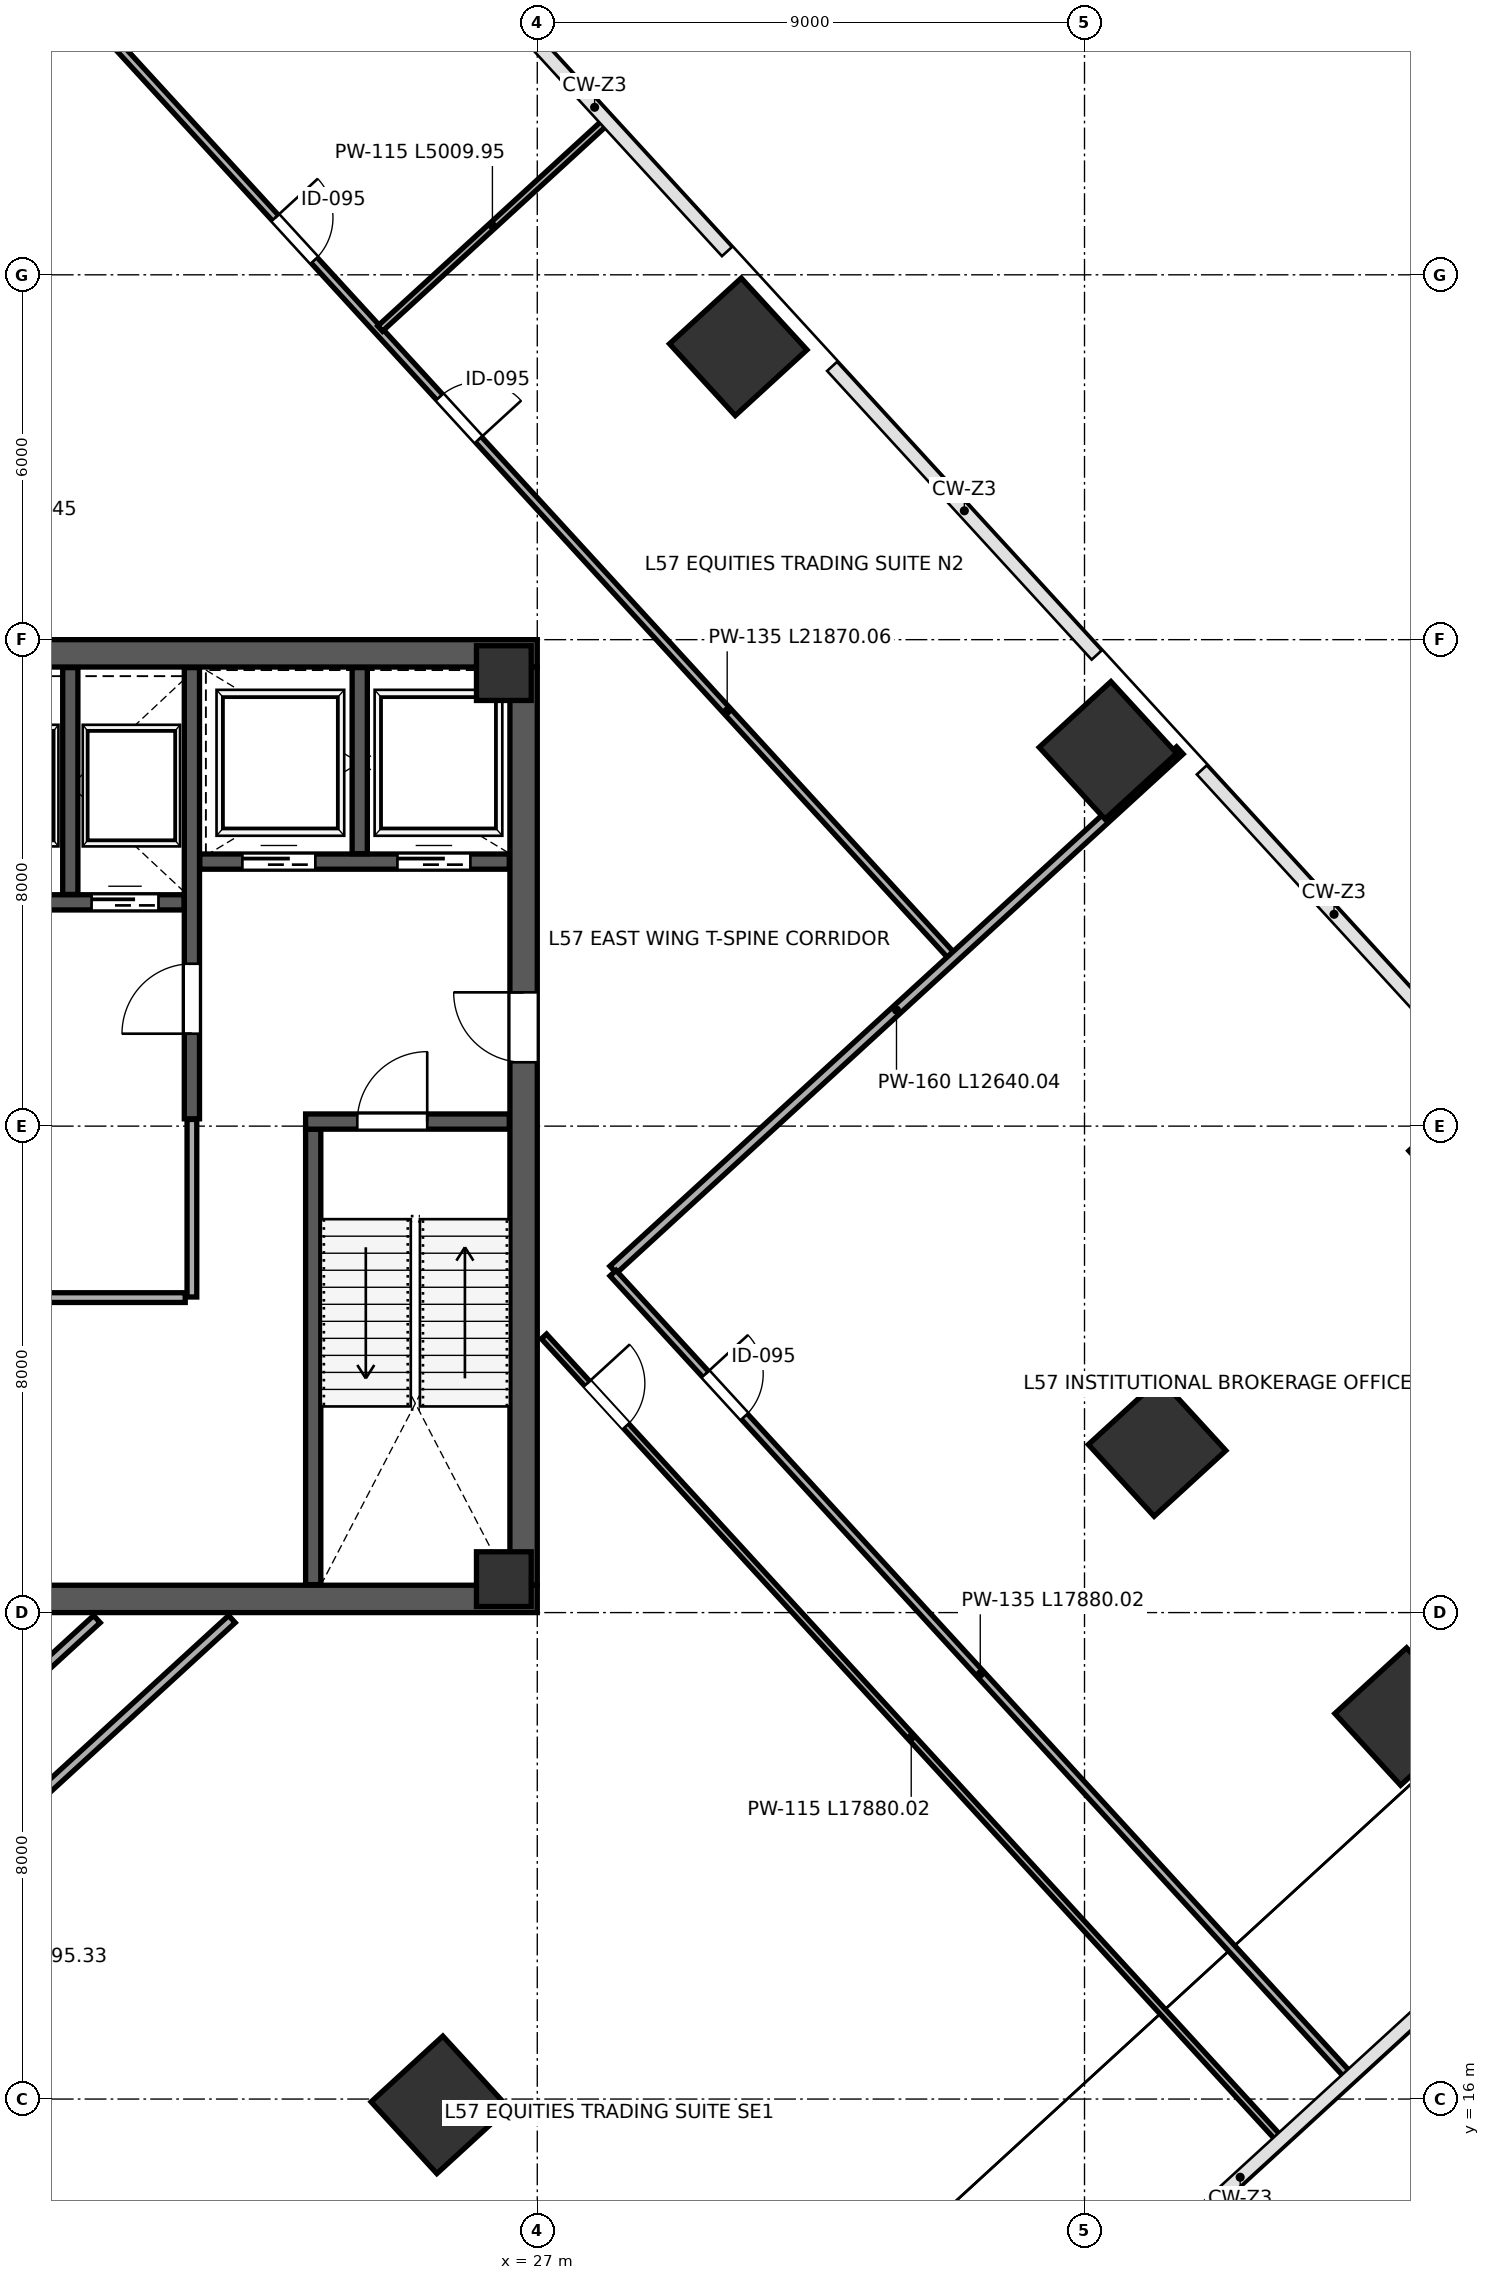
"""IFC4 building model, lengths in metres.
Left out: names, types, materials, properties, quantities, classifications, styles, units other than length and angle.
Written with IfcOpenShell. Run it as: python <this file> out.ifc"""

import sys

from ifc_helpers import new_model, si_unit, direction, frame, frame_2d, origin, origin_2d, place, context, subcontext, project, spatial, rectangle, extrude, source, transform, mapped, element, fill, save


model = new_model("IFC4")
c1 = context("Model", 3, precision=1e-05, world=origin(), true_north=direction((0.0, 1.0)))
c2 = subcontext(c1, "Body", "Model", "MODEL_VIEW")
j1 = project(units=[si_unit("LENGTHUNIT", "METRE"), si_unit("PLANEANGLEUNIT", "RADIAN")], contexts=[c1])
p1 = place(None, origin())
s1 = spatial("IfcSite", under=j1, at=p1, CompositionType="ELEMENT")
p2 = place(p1, origin())
s2 = spatial("IfcBuilding", under=s1, at=p2, CompositionType="ELEMENT")
p3 = place(p2, frame((0.0, 0.0, 254.2)))
s3 = spatial("IfcBuildingStorey", under=s2, at=p3, CompositionType="ELEMENT", Elevation=254.2)
m1 = source(origin(), c2, "Body", "SweptSolid", [
    extrude(rectangle(XDim=0.9, YDim=0.9, at=origin_2d()), origin(), (0.0, 0.0, 1.0), 4.198),
])
for number, where, z_axis, x_axis in (
    (1, (26.45, 24.55, 0.001), (0.0, 0.0, 1.0), (1.0, 0.0, 0.0)),
    (2, (26.45, 39.45, 0.001), (0.0, 0.0, 1.0), (1.0, 0.0, 0.0)),
):
    element("IfcColumn", number, at=place(p3, frame(where, z_axis=z_axis, x_axis=x_axis)), inside=s3, PredefinedType="COLUMN", context=c2, shape_type="MappedRepresentation", body=[
        mapped(m1, transform((0.0, 0.0, 0.0), scale=1.0)),
    ])
m2 = source(origin(), c2, "Body", "SweptSolid", [
    extrude(rectangle(XDim=1.6, YDim=1.6, at=origin_2d()), origin(), (0.0, 0.0, 1.0), 4.198),
])
for number, where, z_axis, x_axis in (
    (3, (30.305, 44.816, 0.001), (0.0, 0.0, 1.0), (-0.676, 0.737, 0.0)),
    (4, (36.385, 38.18, 0.001), (0.0, 0.0, 1.0), (-0.676, 0.737, 0.0)),
):
    element("IfcColumn", number, at=place(p3, frame(where, z_axis=z_axis, x_axis=x_axis)), inside=s3, PredefinedType="COLUMN", context=c2, shape_type="MappedRepresentation", body=[
        mapped(m2, transform((0.0, 0.0, 0.0), scale=1.0)),
    ])
m3 = source(origin(), c2, "Body", "SweptSolid", [
    extrude(rectangle(XDim=1.6, YDim=1.6, at=origin_2d()), origin(), (0.0, 0.0, 1.0), 4.198),
])
for number, where, z_axis, x_axis in (
    (5, (25.398, 15.905, 0.001), (0.0, 0.0, 1.0), (-0.676, 0.737, 0.0)),
    (6, (37.194, 26.714, 0.001), (0.0, 0.0, 1.0), (-0.676, 0.737, 0.0)),
):
    element("IfcColumn", number, at=place(p3, frame(where, z_axis=z_axis, x_axis=x_axis)), inside=s3, PredefinedType="COLUMN", context=c2, shape_type="MappedRepresentation", body=[
        mapped(m3, transform((0.0, 0.0, 0.0), scale=1.0)),
    ])
for number, where, z_axis, x_axis in (
    (7, (42.466, 31.545, 0.001), (0.0, 0.0, 1.0), (-0.676, 0.737, 0.0)),
    (8, (41.248, 22.291, 0.001), (0.0, 0.0, 1.0), (-0.676, 0.737, 0.0)),
):
    element("IfcColumn", number, at=place(p3, frame(where, z_axis=z_axis, x_axis=x_axis)), inside=s3, PredefinedType="COLUMN", context=c2, shape_type="MappedRepresentation", body=[
        mapped(m2, transform((0.0, 0.0, 0.0), scale=1.0)),
    ])
p4 = place(p3, frame((26.775, 24.45, 0.0), z_axis=(0.0, 0.0, 1.0), x_axis=(0.0, 1.0, 0.0)))
e9 = element("IfcWall", 9, at=p4, inside=s3, PredefinedType="SHEAR", context=c2, shape_type="SweptSolid", body=[
    extrude(rectangle(XDim=15.1, YDim=0.45, at=frame_2d((7.55, 0.0))), origin(), (0.0, 0.0, 1.0), 3.96),
])
p5 = place(p4, frame((8.6, 0.0, 0.0)))
e10 = element("IfcOpeningElement", 10, at=p5, cuts=e9, PredefinedType="OPENING", context=c2, shape_type="SweptSolid", body=[
    extrude(rectangle(XDim=1.15, YDim=2.2, at=frame_2d((0.575, 1.1))), frame((0.0, 0.235, 0.0), z_axis=(0.0, -1.0, 0.0), x_axis=(1.0, 0.0, 0.0)), (0.0, 0.0, 1.0), 0.47),
])
for number, where, z_axis, x_axis in (
    (11, (9.0, 24.225, 0.0), (0.0, 0.0, 1.0), (1.0, 0.0, 0.0)),
    (12, (9.0, 39.775, 0.0), (0.0, 0.0, 1.0), (1.0, 0.0, 0.0)),
):
    element("IfcWall", number, at=place(p3, frame(where, z_axis=z_axis, x_axis=x_axis)), inside=s3, PredefinedType="SHEAR", context=c2, shape_type="SweptSolid", body=[
        extrude(rectangle(XDim=18.0, YDim=0.45, at=frame_2d((9.0, 0.0))), origin(), (0.0, 0.0, 1.0), 3.96),
    ])
p6 = place(p3, frame((23.315, 24.46, 0.0), z_axis=(0.0, 0.0, 1.0), x_axis=(0.0, 1.0, 0.0)))
e13 = element("IfcWall", 13, at=p6, inside=s3, PredefinedType="SHEAR", context=c2, shape_type="SweptSolid", body=[
    extrude(rectangle(XDim=7.49, YDim=0.25, at=frame_2d((3.745, 0.0))), origin(), (0.0, 0.0, 1.0), 3.96),
])
p7 = place(p3, frame((23.19, 32.075, 0.0), z_axis=(0.0, 0.0, 1.0), x_axis=(1.0, 0.0, 0.0)))
e14 = element("IfcWall", 14, at=p7, inside=s3, PredefinedType="SHEAR", context=c2, shape_type="SweptSolid", body=[
    extrude(rectangle(XDim=3.35, YDim=0.25, at=frame_2d((1.675, 0.0))), origin(), (0.0, 0.0, 1.0), 3.96),
])
p8 = place(p7, frame((0.85, 0.0, 0.0)))
e15 = element("IfcOpeningElement", 15, at=p8, cuts=e14, PredefinedType="OPENING", context=c2, shape_type="SweptSolid", body=[
    extrude(rectangle(XDim=1.15, YDim=2.2, at=frame_2d((0.575, 1.1))), frame((0.0, 0.135, 0.0), z_axis=(0.0, -1.0, 0.0), x_axis=(1.0, 0.0, 0.0)), (0.0, 0.0, 1.0), 0.27),
])
p9 = place(p3, frame((21.32, 32.12, 0.0), z_axis=(0.0, 0.0, 1.0), x_axis=(0.0, 1.0, 0.0)))
e16 = element("IfcWall", 16, at=p9, inside=s3, PredefinedType="SHEAR", context=c2, shape_type="SweptSolid", body=[
    extrude(rectangle(XDim=7.42, YDim=0.25, at=frame_2d((3.71, 0.0))), origin(), (0.0, 0.0, 1.0), 3.96),
])
p10 = place(p9, frame((1.4, 0.0, 0.0)))
e17 = element("IfcOpeningElement", 17, at=p10, cuts=e16, PredefinedType="OPENING", context=c2, shape_type="SweptSolid", body=[
    extrude(rectangle(XDim=1.15, YDim=2.2, at=frame_2d((0.575, 1.1))), frame((0.0, 0.135, 0.0), z_axis=(0.0, -1.0, 0.0), x_axis=(1.0, 0.0, 0.0)), (0.0, 0.0, 1.0), 0.27),
])
p11 = place(p3, frame((21.45, 36.35, 0.0), z_axis=(0.0, 0.0, 1.0), x_axis=(1.0, 0.0, 0.0)))
e18 = element("IfcWall", 18, at=p11, inside=s3, PredefinedType="SHEAR", context=c2, shape_type="SweptSolid", body=[
    extrude(rectangle(XDim=5.09, YDim=0.25, at=frame_2d((2.545, 0.0))), origin(), (0.0, 0.0, 1.0), 3.96),
])
p12 = place(p11, frame((0.7, 0.0, 0.0)))
e19 = element("IfcOpeningElement", 19, at=p12, cuts=e18, PredefinedType="OPENING", context=c2, shape_type="SweptSolid", body=[
    extrude(rectangle(XDim=1.2, YDim=2.2, at=frame_2d((0.6, 1.1))), frame((0.0, 0.135, 0.0), z_axis=(0.0, -1.0, 0.0), x_axis=(1.0, 0.0, 0.0)), (0.0, 0.0, 1.0), 0.27),
])
p13 = place(p11, frame((3.25, 0.0, 0.0)))
e20 = element("IfcOpeningElement", 20, at=p13, cuts=e18, PredefinedType="OPENING", context=c2, shape_type="SweptSolid", body=[
    extrude(rectangle(XDim=1.2, YDim=2.2, at=frame_2d((0.6, 1.1))), frame((0.0, 0.135, 0.0), z_axis=(0.0, -1.0, 0.0), x_axis=(1.0, 0.0, 0.0)), (0.0, 0.0, 1.0), 0.27),
])
p14 = place(p3, frame((24.08, 36.48, 0.0), z_axis=(0.0, 0.0, 1.0), x_axis=(0.0, 1.0, 0.0)))
e21 = element("IfcWall", 21, at=p14, inside=s3, PredefinedType="SHEAR", context=c2, shape_type="SweptSolid", body=[
    extrude(rectangle(XDim=3.06, YDim=0.25, at=frame_2d((1.53, 0.0))), origin(), (0.0, 0.0, 1.0), 3.96),
])
p15 = place(p3, frame((17.32, 35.68, 0.0), z_axis=(0.0, 0.0, 1.0), x_axis=(1.0, 0.0, 0.0)))
e22 = element("IfcWall", 22, at=p15, inside=s3, PredefinedType="SHEAR", context=c2, shape_type="SweptSolid", body=[
    extrude(rectangle(XDim=3.87, YDim=0.25, at=frame_2d((1.935, 0.0))), origin(), (0.0, 0.0, 1.0), 3.96),
])
p16 = place(p15, frame((0.45, 0.0, 0.0)))
e23 = element("IfcOpeningElement", 23, at=p16, cuts=e22, PredefinedType="OPENING", context=c2, shape_type="SweptSolid", body=[
    extrude(rectangle(XDim=1.1, YDim=2.2, at=frame_2d((0.55, 1.1))), frame((0.0, 0.135, 0.0), z_axis=(0.0, -1.0, 0.0), x_axis=(1.0, 0.0, 0.0)), (0.0, 0.0, 1.0), 0.27),
])
p17 = place(p15, frame((2.35, 0.0, 0.0)))
e24 = element("IfcOpeningElement", 24, at=p17, cuts=e22, PredefinedType="OPENING", context=c2, shape_type="SweptSolid", body=[
    extrude(rectangle(XDim=1.1, YDim=2.2, at=frame_2d((0.55, 1.1))), frame((0.0, 0.135, 0.0), z_axis=(0.0, -1.0, 0.0), x_axis=(1.0, 0.0, 0.0)), (0.0, 0.0, 1.0), 0.27),
])
p18 = place(p3, frame((19.32, 35.81, 0.0), z_axis=(0.0, 0.0, 1.0), x_axis=(0.0, 1.0, 0.0)))
e25 = element("IfcWall", 25, at=p18, inside=s3, PredefinedType="SHEAR", context=c2, shape_type="SweptSolid", body=[
    extrude(rectangle(XDim=3.73, YDim=0.25, at=frame_2d((1.865, 0.0))), origin(), (0.0, 0.0, 1.0), 3.96),
])
p19 = place(p3, frame((12.84, 29.18, 0.0), z_axis=(0.0, 0.0, 1.0), x_axis=(1.0, 0.0, 0.0)))
e26 = element("IfcWall", 26, at=p19, inside=s3, PredefinedType="PARTITIONING", context=c2, shape_type="SweptSolid", body=[
    extrude(rectangle(XDim=8.37, YDim=0.16, at=frame_2d((4.185, 0.0))), origin(), (0.0, 0.0, 1.0), 3.96),
])
p20 = place(p19, frame((2.6, 0.0, 0.0)))
e27 = element("IfcOpeningElement", 27, at=p20, cuts=e26, PredefinedType="OPENING", context=c2, shape_type="SweptSolid", body=[
    extrude(rectangle(XDim=0.9, YDim=2.15, at=frame_2d((0.45, 1.075))), frame((0.0, 0.09, 0.0), z_axis=(0.0, -1.0, 0.0), x_axis=(1.0, 0.0, 0.0)), (0.0, 0.0, 1.0), 0.18),
])
p21 = place(p3, frame((21.32, 29.19, 0.0), z_axis=(0.0, 0.0, 1.0), x_axis=(0.0, 1.0, 0.0)))
e28 = element("IfcWall", 28, at=p21, inside=s3, PredefinedType="PARTITIONING", context=c2, shape_type="SweptSolid", body=[
    extrude(rectangle(XDim=2.92, YDim=0.16, at=frame_2d((1.46, 0.0))), origin(), (0.0, 0.0, 1.0), 3.96),
])
p22 = place(p3, frame((13.765, 18.402, 0.0), z_axis=(0.0, 0.0, 1.0), x_axis=(0.737266340408, 0.675602207887, 0.0)))
e29 = element("IfcWall", 29, at=p22, inside=s3, PredefinedType="PARTITIONING", context=c2, shape_type="SweptSolid", body=[
    extrude(rectangle(XDim=8.128, YDim=0.16, at=frame_2d((4.064, 0.0))), origin(), (0.0, 0.0, 1.0), 3.96),
])
p23 = place(p3, frame((19.042, 50.92, 0.0), z_axis=(0.0, 0.0, 1.0), x_axis=(0.675589646996, -0.737277850523, 0.0)))
e30 = element("IfcWall", 30, at=p23, inside=s3, PredefinedType="PARTITIONING", context=c2, shape_type="SweptSolid", body=[
    extrude(rectangle(XDim=21.87, YDim=0.135, at=frame_2d((10.935, 0.0))), origin(), (0.0, 0.0, 1.0), 3.96),
])
p24 = place(p23, frame((5.4, 0.0, 0.0)))
e31 = element("IfcOpeningElement", 31, at=p24, cuts=e30, PredefinedType="OPENING", context=c2, shape_type="SweptSolid", body=[
    extrude(rectangle(XDim=0.95, YDim=2.15, at=frame_2d((0.475, 1.075))), frame((0.0, 0.078, 0.0), z_axis=(0.0, -1.0, 0.0), x_axis=(1.0, 0.0, 0.0)), (0.0, 0.0, 1.0), 0.155),
])
p25 = place(p23, frame((9.4, 0.0, 0.0)))
e32 = element("IfcOpeningElement", 32, at=p25, cuts=e30, PredefinedType="OPENING", context=c2, shape_type="SweptSolid", body=[
    extrude(rectangle(XDim=0.95, YDim=2.15, at=frame_2d((0.475, 1.075))), frame((0.0, 0.078, 0.0), z_axis=(0.0, -1.0, 0.0), x_axis=(1.0, 0.0, 0.0)), (0.0, 0.0, 1.0), 0.155),
])
p26 = place(p3, frame((24.415, 45.115, 0.0), z_axis=(0.0, 0.0, 1.0), x_axis=(0.737279537385, 0.675587806101, 0.0)))
e33 = element("IfcWall", 33, at=p26, inside=s3, PredefinedType="PARTITIONING", context=c2, shape_type="SweptSolid", body=[
    extrude(rectangle(XDim=5.01, YDim=0.115, at=frame_2d((2.505, 0.0))), origin(), (0.0, 0.0, 1.0), 3.295),
])
p27 = place(p3, frame((1.393, 34.124, 0.0), z_axis=(0.0, 0.0, 1.0), x_axis=(0.737274323436, 0.675593496121, 0.0)))
e34 = element("IfcWall", 34, at=p27, inside=s3, PredefinedType="PARTITIONING", context=c2, shape_type="SweptSolid", body=[
    extrude(rectangle(XDim=27.402, YDim=0.135, at=frame_2d((13.701, 0.0))), origin(), (0.0, 0.0, 1.0), 3.96),
])
p28 = place(p3, frame((28.248, 29.639, 0.0), z_axis=(0.0, 0.0, 1.0), x_axis=(0.73728000412, 0.675587296746, 0.0)))
e35 = element("IfcWall", 35, at=p28, inside=s3, PredefinedType="PARTITIONING", context=c2, shape_type="SweptSolid", body=[
    extrude(rectangle(XDim=12.64, YDim=0.16, at=frame_2d((6.32, 0.0))), origin(), (0.0, 0.0, 1.0), 3.295),
])
p29 = place(p3, frame((12.47, 15.181, 0.0), z_axis=(0.0, 0.0, 1.0), x_axis=(0.737265724175, 0.675602880365, 0.0)))
e36 = element("IfcWall", 36, at=p29, inside=s3, PredefinedType="PARTITIONING", context=c2, shape_type="SweptSolid", body=[
    extrude(rectangle(XDim=12.895, YDim=0.16, at=frame_2d((6.448, 0.0))), origin(), (0.0, 0.0, 1.0), 3.96),
])
p30 = place(p3, frame((28.246, 29.582, 0.0), z_axis=(0.0, 0.0, 1.0), x_axis=(0.67559539026, -0.737272587758, 0.0)))
e37 = element("IfcWall", 37, at=p30, inside=s3, PredefinedType="PARTITIONING", context=c2, shape_type="SweptSolid", body=[
    extrude(rectangle(XDim=17.88, YDim=0.135, at=frame_2d((8.94, 0.0))), origin(), (0.0, 0.0, 1.0), 3.252),
])
p31 = place(p30, frame((2.25, 0.0, 0.0)))
e38 = element("IfcOpeningElement", 38, at=p31, cuts=e37, PredefinedType="OPENING", context=c2, shape_type="SweptSolid", body=[
    extrude(rectangle(XDim=0.95, YDim=2.15, at=frame_2d((0.475, 1.075))), frame((0.0, 0.078, 0.0), z_axis=(0.0, -1.0, 0.0), x_axis=(1.0, 0.0, 0.0)), (0.0, 0.0, 1.0), 0.155),
])
p32 = place(p3, frame((27.11, 28.542, 0.0), z_axis=(0.0, 0.0, 1.0), x_axis=(0.675588589041, -0.737278819957, 0.0)))
e39 = element("IfcWall", 39, at=p32, inside=s3, PredefinedType="PARTITIONING", context=c2, shape_type="SweptSolid", body=[
    extrude(rectangle(XDim=17.88, YDim=0.115, at=frame_2d((8.94, 0.0))), origin(), (0.0, 0.0, 1.0), 3.252),
])
p33 = place(p32, frame((1.05, 0.0, 0.0)))
e40 = element("IfcOpeningElement", 40, at=p33, cuts=e39, PredefinedType="OPENING", context=c2, shape_type="SweptSolid", body=[
    extrude(rectangle(XDim=0.95, YDim=2.15, at=frame_2d((0.475, 1.075))), frame((0.0, 0.067, 0.0), z_axis=(0.0, -1.0, 0.0), x_axis=(1.0, 0.0, 0.0)), (0.0, 0.0, 1.0), 0.135),
])
m4 = source(origin(), c2, "Body", "SweptSolid", [
    extrude(rectangle(XDim=1.15, YDim=2.2, at=frame_2d((0.575, 1.1))), frame((0.0, 0.025, 0.0), z_axis=(0.0, -1.0, 0.0), x_axis=(1.0, 0.0, 0.0)), (0.0, 0.0, 1.0), 0.05),
])
p34 = place(p10, origin())
e41 = element("IfcDoor", 41, at=p34, inside=s3, OperationType="SINGLE_SWING_LEFT", PredefinedType="DOOR", context=c2, shape_type="MappedRepresentation", body=[
    mapped(m4, transform((0.0, 0.0, 0.0), scale=1.0)),
])
fill(e17, e41)
m5 = source(origin(), c2, "Body", "SweptSolid", [
    extrude(rectangle(XDim=1.15, YDim=2.2, at=frame_2d((0.575, 1.1))), frame((0.0, 0.025, 0.0), z_axis=(0.0, -1.0, 0.0), x_axis=(1.0, 0.0, 0.0)), (0.0, 0.0, 1.0), 0.05),
])
p35 = place(p8, origin())
e42 = element("IfcDoor", 42, at=p35, inside=s3, OperationType="SINGLE_SWING_RIGHT", PredefinedType="DOOR", context=c2, shape_type="MappedRepresentation", body=[
    mapped(m5, transform((0.0, 0.0, 0.0), scale=1.0)),
])
fill(e15, e42)
p36 = place(p5, origin())
e43 = element("IfcDoor", 43, at=p36, inside=s3, OperationType="SINGLE_SWING_RIGHT", PredefinedType="DOOR", context=c2, shape_type="MappedRepresentation", body=[
    mapped(m4, transform((0.0, 0.0, 0.0), scale=1.0)),
])
fill(e10, e43)
m6 = source(origin(), c2, "Body", "SweptSolid", [
    extrude(rectangle(XDim=1.1, YDim=2.2, at=frame_2d((0.55, 1.1))), frame((0.0, 0.025, 0.0), z_axis=(0.0, -1.0, 0.0), x_axis=(1.0, 0.0, 0.0)), (0.0, 0.0, 1.0), 0.05),
])
p37 = place(p17, origin())
e44 = element("IfcDoor", 44, at=p37, inside=s3, OperationType="SLIDING_TO_RIGHT", PredefinedType="DOOR", context=c2, shape_type="MappedRepresentation", body=[
    mapped(m6, transform((0.0, 0.0, 0.0), scale=1.0)),
])
fill(e24, e44)
m7 = source(origin(), c2, "Body", "SweptSolid", [
    extrude(rectangle(XDim=1.2, YDim=2.2, at=frame_2d((0.6, 1.1))), frame((0.0, 0.025, 0.0), z_axis=(0.0, -1.0, 0.0), x_axis=(1.0, 0.0, 0.0)), (0.0, 0.0, 1.0), 0.05),
])
p38 = place(p12, origin())
e45 = element("IfcDoor", 45, at=p38, inside=s3, OperationType="SLIDING_TO_LEFT", PredefinedType="DOOR", context=c2, shape_type="MappedRepresentation", body=[
    mapped(m7, transform((0.0, 0.0, 0.0), scale=1.0)),
])
fill(e19, e45)
p39 = place(p13, origin())
e46 = element("IfcDoor", 46, at=p39, inside=s3, OperationType="SLIDING_TO_RIGHT", PredefinedType="DOOR", context=c2, shape_type="MappedRepresentation", body=[
    mapped(m7, transform((0.0, 0.0, 0.0), scale=1.0)),
])
fill(e20, e46)
m8 = source(origin(), c2, "Body", "SweptSolid", [
    extrude(rectangle(XDim=0.95, YDim=2.15, at=frame_2d((0.475, 1.075))), frame((0.0, 0.025, 0.0), z_axis=(0.0, -1.0, 0.0), x_axis=(1.0, 0.0, 0.0)), (0.0, 0.0, 1.0), 0.05),
])
p40 = place(p24, origin())
e47 = element("IfcDoor", 47, at=p40, inside=s3, OperationType="SINGLE_SWING_LEFT", PredefinedType="DOOR", context=c2, shape_type="MappedRepresentation", body=[
    mapped(m8, transform((0.0, 0.0, 0.0), scale=1.0)),
])
fill(e31, e47)
p41 = place(p25, origin())
e48 = element("IfcDoor", 48, at=p41, inside=s3, OperationType="SINGLE_SWING_RIGHT", PredefinedType="DOOR", context=c2, shape_type="MappedRepresentation", body=[
    mapped(m8, transform((0.0, 0.0, 0.0), scale=1.0)),
])
fill(e32, e48)
p42 = place(p31, origin())
e49 = element("IfcDoor", 49, at=p42, inside=s3, OperationType="SINGLE_SWING_LEFT", PredefinedType="DOOR", context=c2, shape_type="MappedRepresentation", body=[
    mapped(m8, transform((0.0, 0.0, 0.0), scale=1.0)),
])
fill(e38, e49)
p43 = place(p33, origin())
e50 = element("IfcDoor", 50, at=p43, inside=s3, OperationType="SINGLE_SWING_LEFT", PredefinedType="DOOR", context=c2, shape_type="MappedRepresentation", body=[
    mapped(m8, transform((0.0, 0.0, 0.0), scale=1.0)),
])
fill(e40, e50)
save(model, sys.argv[1])
